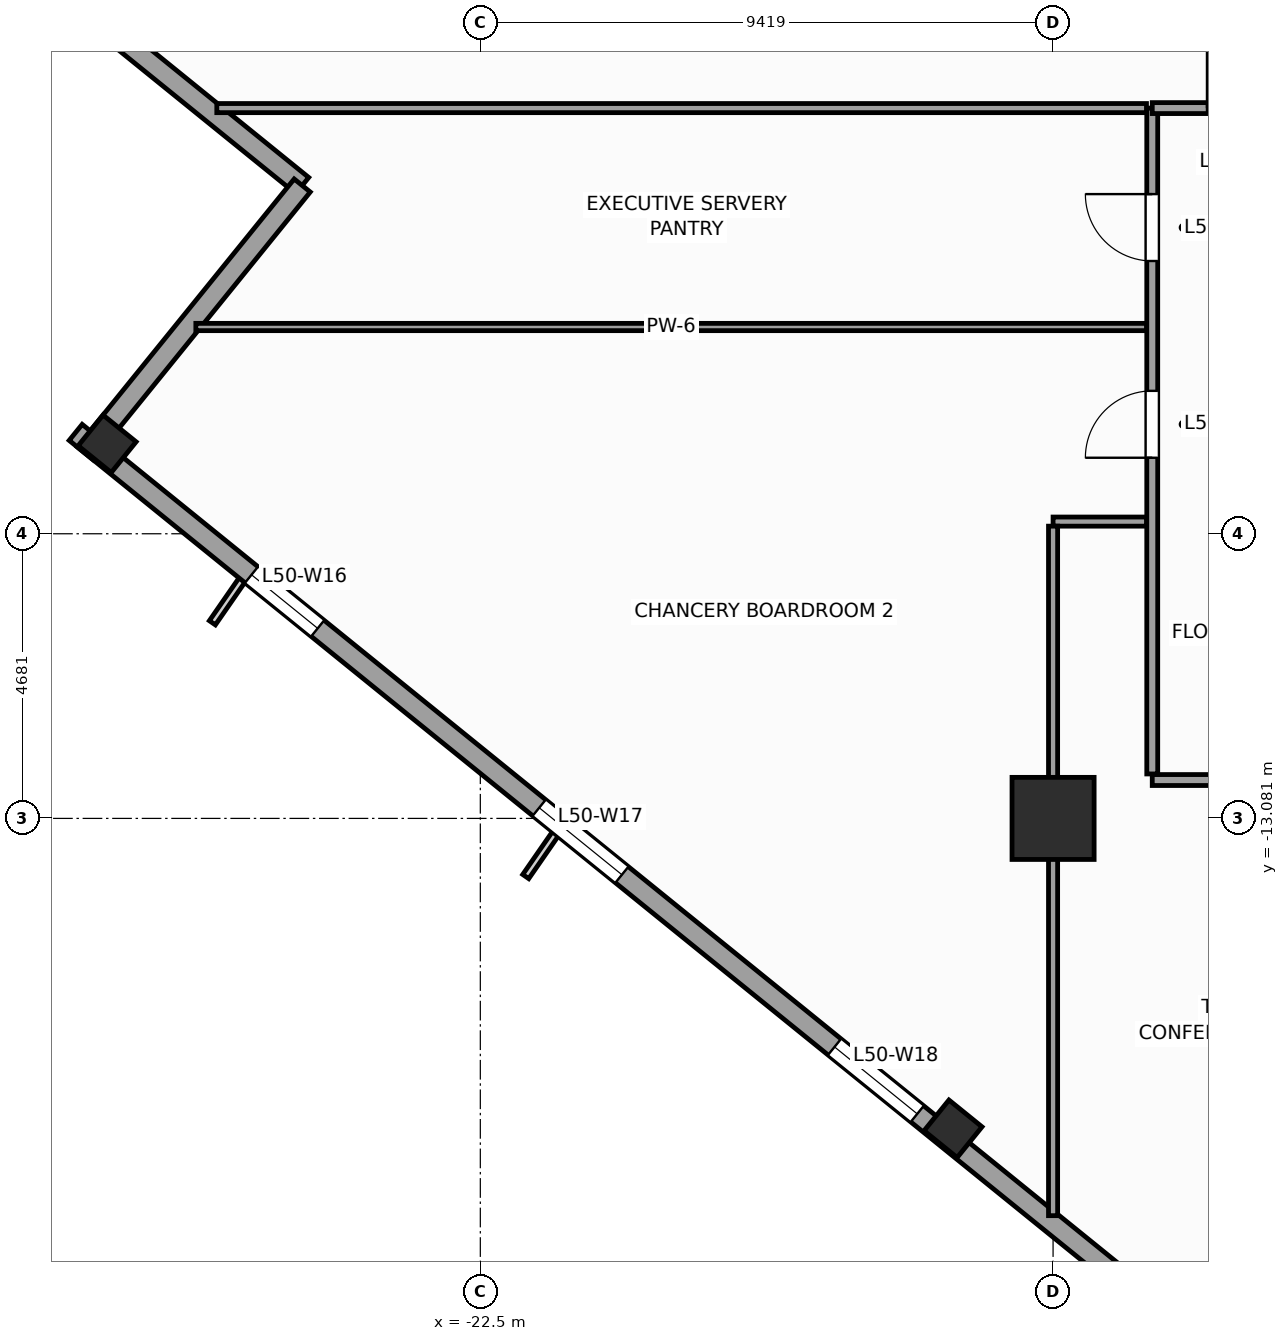
"""IFC4 building model, lengths in metres.
Left out: names, types, materials, properties, quantities, classifications, styles, units other than length and angle.
Written with IfcOpenShell. Run it as: python <this file> out.ifc"""

import sys

from ifc_helpers import new_model, si_unit, direction, frame, frame_2d, origin, origin_2d, place, context, subcontext, project, spatial, rectangle, extrude, source, transform, mapped, element, fill, save


model = new_model("IFC4")
c1 = context("Model", 3, precision=1e-05, world=origin(), true_north=direction((0.0, 1.0)))
c2 = subcontext(c1, "Body", "Model", "MODEL_VIEW")
j1 = project(units=[si_unit("LENGTHUNIT", "METRE"), si_unit("PLANEANGLEUNIT", "RADIAN")], contexts=[c1])
p1 = place(None, origin())
s1 = spatial("IfcSite", under=j1, at=p1, CompositionType="ELEMENT")
p2 = place(p1, origin())
s2 = spatial("IfcBuilding", under=s1, at=p2, CompositionType="ELEMENT")
p3 = place(p2, frame((0.0, 0.0, 209.5)))
s3 = spatial("IfcBuildingStorey", under=s2, at=p3, CompositionType="ELEMENT", Elevation=209.5)
m1 = source(origin(), c2, "Body", "SweptSolid", [
    extrude(rectangle(XDim=1.35, YDim=1.35, at=origin_2d()), origin(), (0.0, 0.0, 1.0), 3.9),
])
p4 = place(p3, frame((-13.081, -13.081, 0.0), z_axis=(0.0, 0.0, 1.0), x_axis=(1.0, 0.0, 0.0)))
e1 = element("IfcColumn", 1, at=p4, inside=s3, PredefinedType="COLUMN", context=c2, shape_type="MappedRepresentation", body=[
    mapped(m1, transform((0.0, 0.0, 0.0), scale=1.0)),
])
m2 = source(origin(), c2, "Body", "SweptSolid", [
    extrude(rectangle(XDim=0.65, YDim=0.7, at=origin_2d()), origin(), (0.0, 0.0, 1.0), 3.9),
])
for number, where, z_axis, x_axis in (
    (2, (-28.637, -6.92, 0.0), (0.0, 0.0, 1.0), (0.629, 0.777, 0.0)),
    (3, (-14.726, -18.185, 0.0), (0.0, 0.0, 1.0), (0.629, 0.777, 0.0)),
):
    element("IfcColumn", number, at=place(p3, frame(where, z_axis=z_axis, x_axis=x_axis)), inside=s3, PredefinedType="COLUMN", context=c2, shape_type="MappedRepresentation", body=[
        mapped(m2, transform((0.0, 0.0, 0.0), scale=1.0)),
    ])
p5 = place(p3, frame((-29.703, 0.789, 0.0), z_axis=(0.0, 0.0, 1.0), x_axis=(0.77714355312, -0.629323365087, 0.0)))
e4 = element("IfcWall", 4, at=p5, inside=s3, PredefinedType="STANDARD", context=c2, shape_type="SweptSolid", body=[
    extrude(rectangle(XDim=5.5, YDim=0.34, at=frame_2d((2.75, 0.0))), origin(), (0.0, 0.0, 1.0), 3.66),
])
p6 = place(p3, frame((-25.429, -2.673, 0.0), z_axis=(0.0, 0.0, 1.0), x_axis=(-0.629299794138, -0.777162640055, 0.0)))
e5 = element("IfcWall", 5, at=p6, inside=s3, PredefinedType="STANDARD", context=c2, shape_type="SweptSolid", body=[
    extrude(rectangle(XDim=5.67, YDim=0.34, at=frame_2d((2.835, 0.0))), origin(), (0.0, 0.0, 1.0), 3.66),
])
p7 = place(p3, frame((-29.154, -6.733, 0.0), z_axis=(0.0, 0.0, 1.0), x_axis=(0.77714192302, -0.629325378072, 0.0)))
e6 = element("IfcWall", 6, at=p7, inside=s3, PredefinedType="STANDARD", context=c2, shape_type="SweptSolid", body=[
    extrude(rectangle(XDim=36.84, YDim=0.34, at=frame_2d((18.42, 0.0))), origin(), (0.0, 0.0, 1.0), 2.96),
])
p8 = place(p7, frame((3.721, 0.0, 0.48)))
e7 = element("IfcOpeningElement", 7, at=p8, cuts=e6, PredefinedType="OPENING", context=c2, shape_type="SweptSolid", body=[
    extrude(rectangle(XDim=1.4, YDim=2.4, at=frame_2d((0.7, 1.2))), frame((0.0, 0.18, 0.0), z_axis=(0.0, -1.0, 0.0), x_axis=(1.0, 0.0, 0.0)), (0.0, 0.0, 1.0), 0.36),
])
p9 = place(p7, frame((9.809, 0.0, 0.58)))
e8 = element("IfcOpeningElement", 8, at=p9, cuts=e6, PredefinedType="OPENING", context=c2, shape_type="SweptSolid", body=[
    extrude(rectangle(XDim=1.75, YDim=2.3, at=frame_2d((0.875, 1.15))), frame((0.0, 0.18, 0.0), z_axis=(0.0, -1.0, 0.0), x_axis=(1.0, 0.0, 0.0)), (0.0, 0.0, 1.0), 0.36),
])
p10 = place(p7, frame((16.058, 0.0, 0.58)))
e9 = element("IfcOpeningElement", 9, at=p10, cuts=e6, PredefinedType="OPENING", context=c2, shape_type="SweptSolid", body=[
    extrude(rectangle(XDim=1.75, YDim=2.3, at=frame_2d((0.875, 1.15))), frame((0.0, 0.18, 0.0), z_axis=(0.0, -1.0, 0.0), x_axis=(1.0, 0.0, 0.0)), (0.0, 0.0, 1.0), 0.36),
])
p11 = place(p7, frame((24.176, 0.0, 0.58)))
e10 = element("IfcOpeningElement", 10, at=p11, cuts=e6, PredefinedType="OPENING", context=c2, shape_type="SweptSolid", body=[
    extrude(rectangle(XDim=1.75, YDim=2.3, at=frame_2d((0.875, 1.15))), frame((0.0, 0.18, 0.0), z_axis=(0.0, -1.0, 0.0), x_axis=(1.0, 0.0, 0.0)), (0.0, 0.0, 1.0), 0.36),
])
p12 = place(p7, frame((30.982, 0.0, 0.48)))
e11 = element("IfcOpeningElement", 11, at=p12, cuts=e6, PredefinedType="OPENING", context=c2, shape_type="SweptSolid", body=[
    extrude(rectangle(XDim=1.4, YDim=2.4, at=frame_2d((0.7, 1.2))), frame((0.0, 0.18, 0.0), z_axis=(0.0, -1.0, 0.0), x_axis=(1.0, 0.0, 0.0)), (0.0, 0.0, 1.0), 0.36),
])
p13 = place(p3, frame((-11.45, -12.45, 0.0), z_axis=(0.0, 0.0, 1.0), x_axis=(1.0, 0.0, 0.0)))
e12 = element("IfcWall", 12, at=p13, inside=s3, PredefinedType="PARTITIONING", context=c2, shape_type="SweptSolid", body=[
    extrude(rectangle(XDim=21.75, YDim=0.18, at=frame_2d((10.875, 0.0))), origin(), (0.0, 0.0, 1.0), 3.66),
])
p14 = place(p13, frame((5.411, 0.0, 0.0)))
e13 = element("IfcOpeningElement", 13, at=p14, cuts=e12, PredefinedType="OPENING", context=c2, shape_type="SweptSolid", body=[
    extrude(rectangle(XDim=0.95, YDim=2.1, at=frame_2d((0.475, 1.05))), frame((0.0, 0.1, 0.0), z_axis=(0.0, -1.0, 0.0), x_axis=(1.0, 0.0, 0.0)), (0.0, 0.0, 1.0), 0.2),
])
p15 = place(p13, frame((1.839, 0.0, 0.0)))
e14 = element("IfcOpeningElement", 14, at=p15, cuts=e12, PredefinedType="OPENING", context=c2, shape_type="SweptSolid", body=[
    extrude(rectangle(XDim=1.1, YDim=2.2, at=frame_2d((0.55, 1.1))), frame((0.0, 0.1, 0.0), z_axis=(0.0, -1.0, 0.0), x_axis=(1.0, 0.0, 0.0)), (0.0, 0.0, 1.0), 0.2),
])
p16 = place(p13, frame((7.574, 0.0, 0.0)))
e15 = element("IfcOpeningElement", 15, at=p16, cuts=e12, PredefinedType="OPENING", context=c2, shape_type="SweptSolid", body=[
    extrude(rectangle(XDim=1.1, YDim=2.2, at=frame_2d((0.55, 1.1))), frame((0.0, 0.1, 0.0), z_axis=(0.0, -1.0, 0.0), x_axis=(1.0, 0.0, 0.0)), (0.0, 0.0, 1.0), 0.2),
])
p17 = place(p13, frame((11.05, 0.0, 0.0)))
e16 = element("IfcOpeningElement", 16, at=p17, cuts=e12, PredefinedType="OPENING", context=c2, shape_type="SweptSolid", body=[
    extrude(rectangle(XDim=1.1, YDim=2.2, at=frame_2d((0.55, 1.1))), frame((0.0, 0.1, 0.0), z_axis=(0.0, -1.0, 0.0), x_axis=(1.0, 0.0, 0.0)), (0.0, 0.0, 1.0), 0.2),
])
p18 = place(p13, frame((15.65, 0.0, 0.0)))
e17 = element("IfcOpeningElement", 17, at=p18, cuts=e12, PredefinedType="OPENING", context=c2, shape_type="SweptSolid", body=[
    extrude(rectangle(XDim=1.1, YDim=2.2, at=frame_2d((0.55, 1.1))), frame((0.0, 0.1, 0.0), z_axis=(0.0, -1.0, 0.0), x_axis=(1.0, 0.0, 0.0)), (0.0, 0.0, 1.0), 0.2),
])
p19 = place(p3, frame((-11.45, -12.35, 0.0), z_axis=(0.0, 0.0, 1.0), x_axis=(0.0, 1.0, 0.0)))
e18 = element("IfcWall", 18, at=p19, inside=s3, PredefinedType="PARTITIONING", context=c2, shape_type="SweptSolid", body=[
    extrude(rectangle(XDim=10.95, YDim=0.18, at=frame_2d((5.475, 0.0))), origin(), (0.0, 0.0, 1.0), 3.66),
])
p20 = place(p19, frame((8.436, 0.0, 0.0)))
e19 = element("IfcOpeningElement", 19, at=p20, cuts=e18, PredefinedType="OPENING", context=c2, shape_type="SweptSolid", body=[
    extrude(rectangle(XDim=1.1, YDim=2.2, at=frame_2d((0.55, 1.1))), frame((0.0, 0.1, 0.0), z_axis=(0.0, -1.0, 0.0), x_axis=(1.0, 0.0, 0.0)), (0.0, 0.0, 1.0), 0.2),
])
p21 = place(p19, frame((5.2, 0.0, 0.0)))
e20 = element("IfcOpeningElement", 20, at=p21, cuts=e18, PredefinedType="OPENING", context=c2, shape_type="SweptSolid", body=[
    extrude(rectangle(XDim=1.1, YDim=2.2, at=frame_2d((0.55, 1.1))), frame((0.0, 0.1, 0.0), z_axis=(0.0, -1.0, 0.0), x_axis=(1.0, 0.0, 0.0)), (0.0, 0.0, 1.0), 0.2),
])
p22 = place(p3, frame((-11.45, -1.4, 0.0), z_axis=(0.0, 0.0, 1.0), x_axis=(1.0, 0.0, 0.0)))
e21 = element("IfcWall", 21, at=p22, inside=s3, PredefinedType="PARTITIONING", context=c2, shape_type="SweptSolid", body=[
    extrude(rectangle(XDim=2.9, YDim=0.18, at=frame_2d((1.45, 0.0))), origin(), (0.0, 0.0, 1.0), 3.66),
])
p23 = place(p22, frame((0.9, 0.0, 0.0)))
e22 = element("IfcOpeningElement", 22, at=p23, cuts=e21, PredefinedType="OPENING", context=c2, shape_type="SweptSolid", body=[
    extrude(rectangle(XDim=1.1, YDim=2.2, at=frame_2d((0.55, 1.1))), frame((0.0, 0.1, 0.0), z_axis=(0.0, -1.0, 0.0), x_axis=(1.0, 0.0, 0.0)), (0.0, 0.0, 1.0), 0.2),
])
p24 = place(p3, frame((-26.834, -1.4, 0.0), z_axis=(0.0, 0.0, 1.0), x_axis=(1.0, 0.0, 0.0)))
e23 = element("IfcWall", 23, at=p24, inside=s3, PredefinedType="PARTITIONING", context=c2, shape_type="SweptSolid", body=[
    extrude(rectangle(XDim=15.289, YDim=0.15, at=frame_2d((7.645, 0.0))), origin(), (0.0, 0.0, 1.0), 3.66),
])
p25 = place(p3, frame((-11.545, -8.2, 0.0), z_axis=(0.0, 0.0, 1.0), x_axis=(-1.0, 0.0, 0.0)))
e24 = element("IfcWall", 24, at=p25, inside=s3, PredefinedType="PARTITIONING", context=c2, shape_type="SweptSolid", body=[
    extrude(rectangle(XDim=1.536, YDim=0.15, at=frame_2d((0.768, 0.0))), origin(), (0.0, 0.0, 1.0), 3.66),
])
p26 = place(p3, frame((-13.081, -8.275, 0.0), z_axis=(0.0, 0.0, 1.0), x_axis=(0.0, -1.0, 0.0)))
e25 = element("IfcWall", 25, at=p26, inside=s3, PredefinedType="PARTITIONING", context=c2, shape_type="SweptSolid", body=[
    extrude(rectangle(XDim=11.339, YDim=0.15, at=frame_2d((5.669, 0.0))), origin(), (0.0, 0.0, 1.0), 2.76),
])
p27 = place(p3, frame((-27.178, -5.0, 0.0), z_axis=(0.0, 0.0, 1.0), x_axis=(1.0, 0.0, 0.0)))
e26 = element("IfcWall", 26, at=p27, inside=s3, PredefinedType="PARTITIONING", context=c2, shape_type="SweptSolid", body=[
    extrude(rectangle(XDim=15.634, YDim=0.12, at=frame_2d((7.817, 0.0))), origin(), (0.0, 0.0, 1.0), 3.66),
])
m3 = source(origin(), c2, "Body", "SweptSolid", [
    extrude(rectangle(XDim=1.4, YDim=2.4, at=frame_2d((0.7, 1.2))), frame((0.0, 0.03, 0.0), z_axis=(0.0, -1.0, 0.0), x_axis=(1.0, 0.0, 0.0)), (0.0, 0.0, 1.0), 0.06),
])
p28 = place(p8, origin())
e27 = element("IfcWindow", 27, at=p28, inside=s3, PartitioningType="SINGLE_PANEL", PredefinedType="WINDOW", context=c2, shape_type="MappedRepresentation", body=[
    mapped(m3, transform((0.0, 0.0, 0.0), scale=1.0)),
])
fill(e7, e27)
m4 = source(origin(), c2, "Body", "SweptSolid", [
    extrude(rectangle(XDim=1.75, YDim=2.3, at=frame_2d((0.875, 1.15))), frame((0.0, 0.03, 0.0), z_axis=(0.0, -1.0, 0.0), x_axis=(1.0, 0.0, 0.0)), (0.0, 0.0, 1.0), 0.06),
])
p29 = place(p9, origin())
e28 = element("IfcWindow", 28, at=p29, inside=s3, PartitioningType="SINGLE_PANEL", PredefinedType="WINDOW", context=c2, shape_type="MappedRepresentation", body=[
    mapped(m4, transform((0.0, 0.0, 0.0), scale=1.0)),
])
fill(e8, e28)
p30 = place(p10, origin())
e29 = element("IfcWindow", 29, at=p30, inside=s3, PartitioningType="SINGLE_PANEL", PredefinedType="WINDOW", context=c2, shape_type="MappedRepresentation", body=[
    mapped(m4, transform((0.0, 0.0, 0.0), scale=1.0)),
])
fill(e9, e29)
m5 = source(origin(), c2, "Body", "SweptSolid", [
    extrude(rectangle(XDim=1.1, YDim=2.2, at=frame_2d((0.55, 1.1))), frame((0.0, 0.025, 0.0), z_axis=(0.0, -1.0, 0.0), x_axis=(1.0, 0.0, 0.0)), (0.0, 0.0, 1.0), 0.05),
])
p31 = place(p23, origin())
e30 = element("IfcDoor", 30, at=p31, inside=s3, OperationType="SINGLE_SWING_LEFT", PredefinedType="DOOR", context=c2, shape_type="MappedRepresentation", body=[
    mapped(m5, transform((0.0, 0.0, 0.0), scale=1.0)),
])
fill(e22, e30)
p32 = place(p20, origin())
e31 = element("IfcDoor", 31, at=p32, inside=s3, OperationType="SINGLE_SWING_RIGHT", PredefinedType="DOOR", context=c2, shape_type="MappedRepresentation", body=[
    mapped(m5, transform((0.0, 0.0, 0.0), scale=1.0)),
])
fill(e19, e31)
p33 = place(p21, origin())
e32 = element("IfcDoor", 32, at=p33, inside=s3, OperationType="SINGLE_SWING_LEFT", PredefinedType="DOOR", context=c2, shape_type="MappedRepresentation", body=[
    mapped(m5, transform((0.0, 0.0, 0.0), scale=1.0)),
])
fill(e20, e32)
save(model, sys.argv[1])
